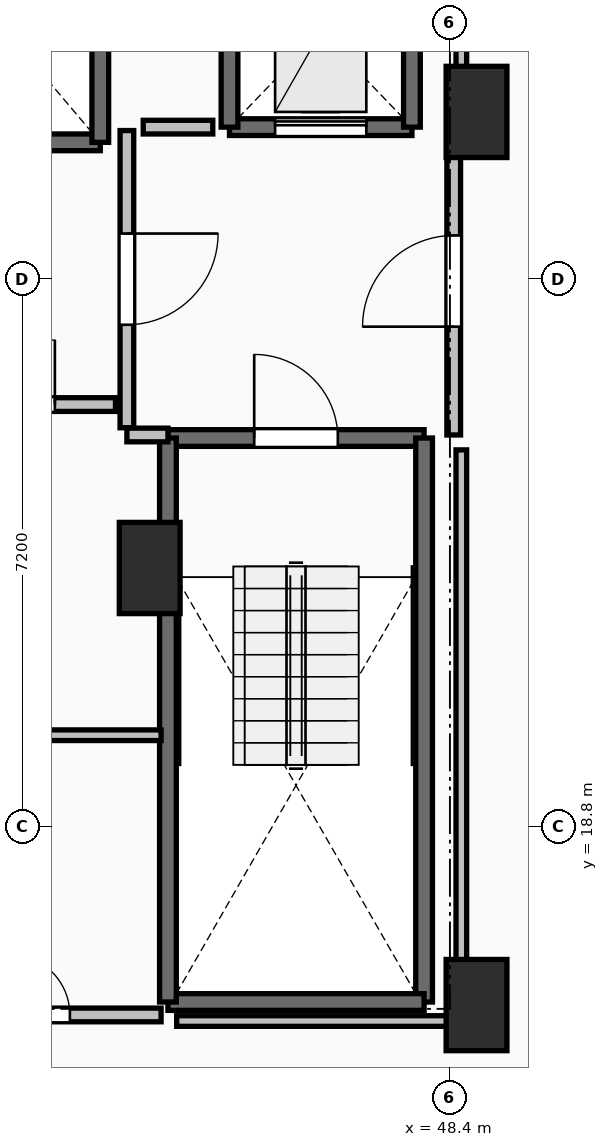
"""IFC4 building model, lengths in metres.
Left out: names, types, materials, properties, quantities, classifications, styles, units other than length and angle.
Written with IfcOpenShell. Run it as: python <this file> out.ifc"""

import sys

from ifc_helpers import new_model, si_unit, direction, frame, frame_2d, origin, origin_2d, place, context, subcontext, project, spatial, rectangle, extrude, element, fill, save


model = new_model("IFC4")
c1 = context("Model", 3, precision=1e-05, world=origin(), true_north=direction((0.0, 1.0)))
c2 = subcontext(c1, "Body", "Model", "MODEL_VIEW")
j1 = project(units=[si_unit("LENGTHUNIT", "METRE"), si_unit("PLANEANGLEUNIT", "RADIAN")], contexts=[c1])
p1 = place(None, origin())
s1 = spatial("IfcSite", under=j1, at=p1, CompositionType="ELEMENT")
p2 = place(p1, origin())
s2 = spatial("IfcBuilding", under=s1, at=p2, CompositionType="ELEMENT")
p3 = place(p2, frame((0.0, 0.0, 106.8)))
s3 = spatial("IfcBuildingStorey", under=s2, at=p3, CompositionType="ELEMENT", Elevation=106.8)
for number, where, z_axis, x_axis in (
    (1, (48.75, 28.2, 0.0), (0.0, 0.0, 1.0), (1.0, 0.0, 0.0)),
    (2, (48.75, 16.45, 0.0), (0.0, 0.0, 1.0), (1.0, 0.0, 0.0)),
    (3, (44.45, 22.2, 0.0), (0.0, 0.0, 1.0), (1.0, 0.0, 0.0)),
):
    element("IfcColumn", number, at=place(p3, frame(where, z_axis=z_axis, x_axis=x_axis)), inside=s3, PredefinedType="PILASTER", context=c2, shape_type="SweptSolid", body=[
        extrude(rectangle(XDim=0.8, YDim=1.2, at=origin_2d()), origin(), (0.0, 0.0, 1.0), 3.5),
    ])
p4 = place(p3, frame((44.69, 23.91, 0.0), z_axis=(0.0, 0.0, 1.0), x_axis=(1.0, 0.0, 0.0)))
e4 = element("IfcWall", 4, at=p4, inside=s3, PredefinedType="SOLIDWALL", context=c2, shape_type="SweptSolid", body=[
    extrude(rectangle(XDim=3.37, YDim=0.22, at=frame_2d((1.685, 0.0))), origin(), (0.0, 0.0, 1.0), 3.24),
])
p5 = place(p4, frame((1.135, 0.0, 0.0)))
e5 = element("IfcOpeningElement", 5, at=p5, cuts=e4, PredefinedType="OPENING", context=c2, shape_type="SweptSolid", body=[
    extrude(rectangle(XDim=1.1, YDim=2.15, at=frame_2d((0.55, 1.075))), frame((0.0, 0.125, 0.0), z_axis=(0.0, -1.0, 0.0), x_axis=(1.0, 0.0, 0.0)), (0.0, 0.0, 1.0), 0.25),
])
p6 = place(p3, frame((48.06, 23.91, 0.0), z_axis=(0.0, 0.0, 1.0), x_axis=(0.0, -1.0, 0.0)))
e6 = element("IfcWall", 6, at=p6, inside=s3, PredefinedType="SOLIDWALL", context=c2, shape_type="SweptSolid", body=[
    extrude(rectangle(XDim=7.42, YDim=0.22, at=frame_2d((3.71, 0.0))), origin(), (0.0, 0.0, 1.0), 3.24),
])
p7 = place(p3, frame((48.06, 16.49, 0.0), z_axis=(0.0, 0.0, 1.0), x_axis=(-1.0, 0.0, 0.0)))
e7 = element("IfcWall", 7, at=p7, inside=s3, PredefinedType="SOLIDWALL", context=c2, shape_type="SweptSolid", body=[
    extrude(rectangle(XDim=3.37, YDim=0.22, at=frame_2d((1.685, 0.0))), origin(), (0.0, 0.0, 1.0), 3.24),
])
p8 = place(p3, frame((44.69, 16.49, 0.0), z_axis=(0.0, 0.0, 1.0), x_axis=(0.0, 1.0, 0.0)))
e8 = element("IfcWall", 8, at=p8, inside=s3, PredefinedType="SOLIDWALL", context=c2, shape_type="SweptSolid", body=[
    extrude(rectangle(XDim=7.42, YDim=0.22, at=frame_2d((3.71, 0.0))), origin(), (0.0, 0.0, 1.0), 3.24),
])
p9 = place(p3, frame((41.6, 27.8, 0.0), z_axis=(0.0, 0.0, 1.0), x_axis=(1.0, 0.0, 0.0)))
e9 = element("IfcWall", 9, at=p9, inside=s3, PredefinedType="SOLIDWALL", context=c2, shape_type="SweptSolid", body=[
    extrude(rectangle(XDim=2.2, YDim=0.22, at=frame_2d((1.1, 0.0))), origin(), (0.0, 0.0, 1.0), 3.24),
])
p10 = place(p3, frame((43.8, 27.8, 0.0), z_axis=(0.0, 0.0, 1.0), x_axis=(0.0, 1.0, 0.0)))
e10 = element("IfcWall", 10, at=p10, inside=s3, PredefinedType="SOLIDWALL", context=c2, shape_type="SweptSolid", body=[
    extrude(rectangle(XDim=2.6, YDim=0.22, at=frame_2d((1.3, 0.0))), origin(), (0.0, 0.0, 1.0), 3.24),
])
p11 = place(p3, frame((45.5, 28.0, 0.0), z_axis=(0.0, 0.0, 1.0), x_axis=(1.0, 0.0, 0.0)))
e11 = element("IfcWall", 11, at=p11, inside=s3, PredefinedType="SHEAR", context=c2, shape_type="SweptSolid", body=[
    extrude(rectangle(XDim=2.4, YDim=0.22, at=frame_2d((1.2, 0.0))), origin(), (0.0, 0.0, 1.0), 3.24),
])
p12 = place(p11, frame((0.6, 0.0, 0.0)))
e12 = element("IfcOpeningElement", 12, at=p12, cuts=e11, PredefinedType="OPENING", context=c2, shape_type="SweptSolid", body=[
    extrude(rectangle(XDim=1.2, YDim=2.2, at=frame_2d((0.6, 1.1))), frame((0.0, 0.125, 0.0), z_axis=(0.0, -1.0, 0.0), x_axis=(1.0, 0.0, 0.0)), (0.0, 0.0, 1.0), 0.25),
])
for number, where, z_axis, x_axis in (
    (13, (47.9, 28.0, 0.0), (0.0, 0.0, 1.0), (0.0, 1.0, 0.0)),
    (14, (45.5, 30.5, 0.0), (0.0, 0.0, 1.0), (0.0, -1.0, 0.0)),
):
    element("IfcWall", number, at=place(p3, frame(where, z_axis=z_axis, x_axis=x_axis)), inside=s3, PredefinedType="SHEAR", context=c2, shape_type="SweptSolid", body=[
        extrude(rectangle(XDim=2.5, YDim=0.22, at=frame_2d((1.25, 0.0))), origin(), (0.0, 0.0, 1.0), 3.24),
    ])
p13 = place(p3, frame((44.15, 27.955, 0.0), z_axis=(0.0, 0.0, 1.0), x_axis=(0.0, -1.0, 0.0)))
e15 = element("IfcWall", 15, at=p13, inside=s3, PredefinedType="PARTITIONING", context=c2, shape_type="SweptSolid", body=[
    extrude(rectangle(XDim=3.91, YDim=0.18, at=frame_2d((1.955, 0.0))), origin(), (0.0, 0.0, 1.0), 3.24),
])
p14 = place(p13, frame((1.355, 0.0, 0.0)))
e16 = element("IfcOpeningElement", 16, at=p14, cuts=e15, PredefinedType="OPENING", context=c2, shape_type="SweptSolid", body=[
    extrude(rectangle(XDim=1.2, YDim=2.15, at=frame_2d((0.6, 1.075))), frame((0.0, 0.105, 0.0), z_axis=(0.0, -1.0, 0.0), x_axis=(1.0, 0.0, 0.0)), (0.0, 0.0, 1.0), 0.21),
])
p15 = place(p3, frame((44.15, 23.95, 0.0), z_axis=(0.0, 0.0, 1.0), x_axis=(1.0, 0.0, 0.0)))
e17 = element("IfcWall", 17, at=p15, inside=s3, PredefinedType="PARTITIONING", context=c2, shape_type="SweptSolid", body=[
    extrude(rectangle(XDim=0.54, YDim=0.18, at=frame_2d((0.27, 0.0))), origin(), (0.0, 0.0, 1.0), 3.24),
])
p16 = place(p3, frame((48.45, 23.95, 0.0), z_axis=(0.0, 0.0, 1.0), x_axis=(0.0, 1.0, 0.0)))
e18 = element("IfcWall", 18, at=p16, inside=s3, PredefinedType="PARTITIONING", context=c2, shape_type="SweptSolid", body=[
    extrude(rectangle(XDim=4.05, YDim=0.18, at=frame_2d((2.025, 0.0))), origin(), (0.0, 0.0, 1.0), 3.24),
])
p17 = place(p16, frame((1.425, 0.0, 0.0)))
e19 = element("IfcOpeningElement", 19, at=p17, cuts=e18, PredefinedType="OPENING", context=c2, shape_type="SweptSolid", body=[
    extrude(rectangle(XDim=1.2, YDim=2.15, at=frame_2d((0.6, 1.075))), frame((0.0, 0.105, 0.0), z_axis=(0.0, -1.0, 0.0), x_axis=(1.0, 0.0, 0.0)), (0.0, 0.0, 1.0), 0.21),
])
p18 = place(p3, frame((41.555, 24.35, 0.0), z_axis=(0.0, 0.0, 1.0), x_axis=(1.0, 0.0, 0.0)))
e20 = element("IfcWall", 20, at=p18, inside=s3, PredefinedType="PARTITIONING", context=c2, shape_type="SweptSolid", body=[
    extrude(rectangle(XDim=2.445, YDim=0.18, at=frame_2d((1.223, 0.0))), origin(), (0.0, 0.0, 1.0), 3.24),
])
p19 = place(p18, frame((0.798, 0.0, 0.0)))
e21 = element("IfcOpeningElement", 21, at=p19, cuts=e20, PredefinedType="OPENING", context=c2, shape_type="SweptSolid", body=[
    extrude(rectangle(XDim=0.85, YDim=2.1, at=frame_2d((0.425, 1.05))), frame((0.0, 0.105, 0.0), z_axis=(0.0, -1.0, 0.0), x_axis=(1.0, 0.0, 0.0)), (0.0, 0.0, 1.0), 0.21),
])
p20 = place(p3, frame((44.6, 20.0, 0.0), z_axis=(0.0, 0.0, 1.0), x_axis=(-1.0, 0.0, 0.0)))
e22 = element("IfcWall", 22, at=p20, inside=s3, PredefinedType="PARTITIONING", context=c2, shape_type="SweptSolid", body=[
    extrude(rectangle(XDim=3.2, YDim=0.14, at=frame_2d((1.6, 0.0))), origin(), (0.0, 0.0, 1.0), 3.24),
])
p21 = place(p3, frame((41.4, 16.32, 0.0), z_axis=(0.0, 0.0, 1.0), x_axis=(1.0, 0.0, 0.0)))
e23 = element("IfcWall", 23, at=p21, inside=s3, PredefinedType="PARTITIONING", context=c2, shape_type="SweptSolid", body=[
    extrude(rectangle(XDim=3.2, YDim=0.18, at=frame_2d((1.6, 0.0))), origin(), (0.0, 0.0, 1.0), 3.24),
])
p22 = place(p21, frame((1.2, 0.0, 0.0)))
e24 = element("IfcOpeningElement", 24, at=p22, cuts=e23, PredefinedType="OPENING", context=c2, shape_type="SweptSolid", body=[
    extrude(rectangle(XDim=0.8, YDim=2.05, at=frame_2d((0.4, 1.025))), frame((0.0, 0.105, 0.0), z_axis=(0.0, -1.0, 0.0), x_axis=(1.0, 0.0, 0.0)), (0.0, 0.0, 1.0), 0.21),
])
p23 = place(p3, frame((45.28, 28.0, 0.0), z_axis=(0.0, 0.0, 1.0), x_axis=(-1.0, 0.0, 0.0)))
e25 = element("IfcWall", 25, at=p23, inside=s3, PredefinedType="PARTITIONING", context=c2, shape_type="SweptSolid", body=[
    extrude(rectangle(XDim=0.915, YDim=0.18, at=frame_2d((0.458, 0.0))), origin(), (0.0, 0.0, 1.0), 3.24),
])
p24 = place(p3, frame((48.55, 33.45, 0.0), z_axis=(0.0, 0.0, 1.0), x_axis=(0.0, -1.0, 0.0)))
e26 = element("IfcWall", 26, at=p24, inside=s3, PredefinedType="PARTITIONING", context=c2, shape_type="SweptSolid", body=[
    extrude(rectangle(XDim=5.254, YDim=0.14, at=frame_2d((2.627, 0.0))), origin(), (0.0, 0.0, 1.0), 2.432),
])
p25 = place(p3, frame((48.55, 23.754, 0.0), z_axis=(0.0, 0.0, 1.0), x_axis=(0.0, -1.0, 0.0)))
e27 = element("IfcWall", 27, at=p25, inside=s3, PredefinedType="PARTITIONING", context=c2, shape_type="SweptSolid", body=[
    extrude(rectangle(XDim=7.514, YDim=0.14, at=frame_2d((3.757, 0.0))), origin(), (0.0, 0.0, 1.0), 2.432),
])
p26 = place(p3, frame((48.55, 16.24, 0.0), z_axis=(0.0, 0.0, 1.0), x_axis=(-1.0, 0.0, 0.0)))
e28 = element("IfcWall", 28, at=p26, inside=s3, PredefinedType="PARTITIONING", context=c2, shape_type="SweptSolid", body=[
    extrude(rectangle(XDim=3.745, YDim=0.14, at=frame_2d((1.873, 0.0))), origin(), (0.0, 0.0, 1.0), 2.432),
])
p27 = place(p5, origin())
e29 = element("IfcDoor", 29, at=p27, inside=s3, OperationType="SINGLE_SWING_LEFT", PredefinedType="DOOR", context=c2, shape_type="SweptSolid", body=[
    extrude(rectangle(XDim=1.1, YDim=2.15, at=frame_2d((0.55, 1.075))), frame((0.0, 0.025, 0.0), z_axis=(0.0, -1.0, 0.0), x_axis=(1.0, 0.0, 0.0)), (0.0, 0.0, 1.0), 0.05),
])
fill(e5, e29)
p28 = place(p12, origin())
e30 = element("IfcDoor", 30, at=p28, inside=s3, OperationType="SLIDING_TO_LEFT", PredefinedType="DOOR", context=c2, shape_type="SweptSolid", body=[
    extrude(rectangle(XDim=1.2, YDim=2.2, at=frame_2d((0.6, 1.1))), frame((0.0, 0.025, 0.0), z_axis=(0.0, -1.0, 0.0), x_axis=(1.0, 0.0, 0.0)), (0.0, 0.0, 1.0), 0.05),
])
fill(e12, e30)
p29 = place(p14, origin())
e31 = element("IfcDoor", 31, at=p29, inside=s3, OperationType="SINGLE_SWING_LEFT", PredefinedType="DOOR", context=c2, shape_type="SweptSolid", body=[
    extrude(rectangle(XDim=1.2, YDim=2.15, at=frame_2d((0.6, 1.075))), frame((0.0, 0.025, 0.0), z_axis=(0.0, -1.0, 0.0), x_axis=(1.0, 0.0, 0.0)), (0.0, 0.0, 1.0), 0.05),
])
fill(e16, e31)
p30 = place(p17, origin())
e32 = element("IfcDoor", 32, at=p30, inside=s3, OperationType="SINGLE_SWING_LEFT", PredefinedType="DOOR", context=c2, shape_type="SweptSolid", body=[
    extrude(rectangle(XDim=1.2, YDim=2.15, at=frame_2d((0.6, 1.075))), frame((0.0, 0.025, 0.0), z_axis=(0.0, -1.0, 0.0), x_axis=(1.0, 0.0, 0.0)), (0.0, 0.0, 1.0), 0.05),
])
fill(e19, e32)
p31 = place(p19, origin())
e33 = element("IfcDoor", 33, at=p31, inside=s3, OperationType="SINGLE_SWING_RIGHT", PredefinedType="DOOR", context=c2, shape_type="SweptSolid", body=[
    extrude(rectangle(XDim=0.85, YDim=2.1, at=frame_2d((0.425, 1.05))), frame((0.0, 0.025, 0.0), z_axis=(0.0, -1.0, 0.0), x_axis=(1.0, 0.0, 0.0)), (0.0, 0.0, 1.0), 0.05),
])
fill(e21, e33)
p32 = place(p22, origin())
e34 = element("IfcDoor", 34, at=p32, inside=s3, OperationType="SINGLE_SWING_LEFT", PredefinedType="DOOR", context=c2, shape_type="SweptSolid", body=[
    extrude(rectangle(XDim=0.8, YDim=2.05, at=frame_2d((0.4, 1.025))), frame((0.0, 0.025, 0.0), z_axis=(0.0, -1.0, 0.0), x_axis=(1.0, 0.0, 0.0)), (0.0, 0.0, 1.0), 0.05),
])
fill(e24, e34)
save(model, sys.argv[1])
